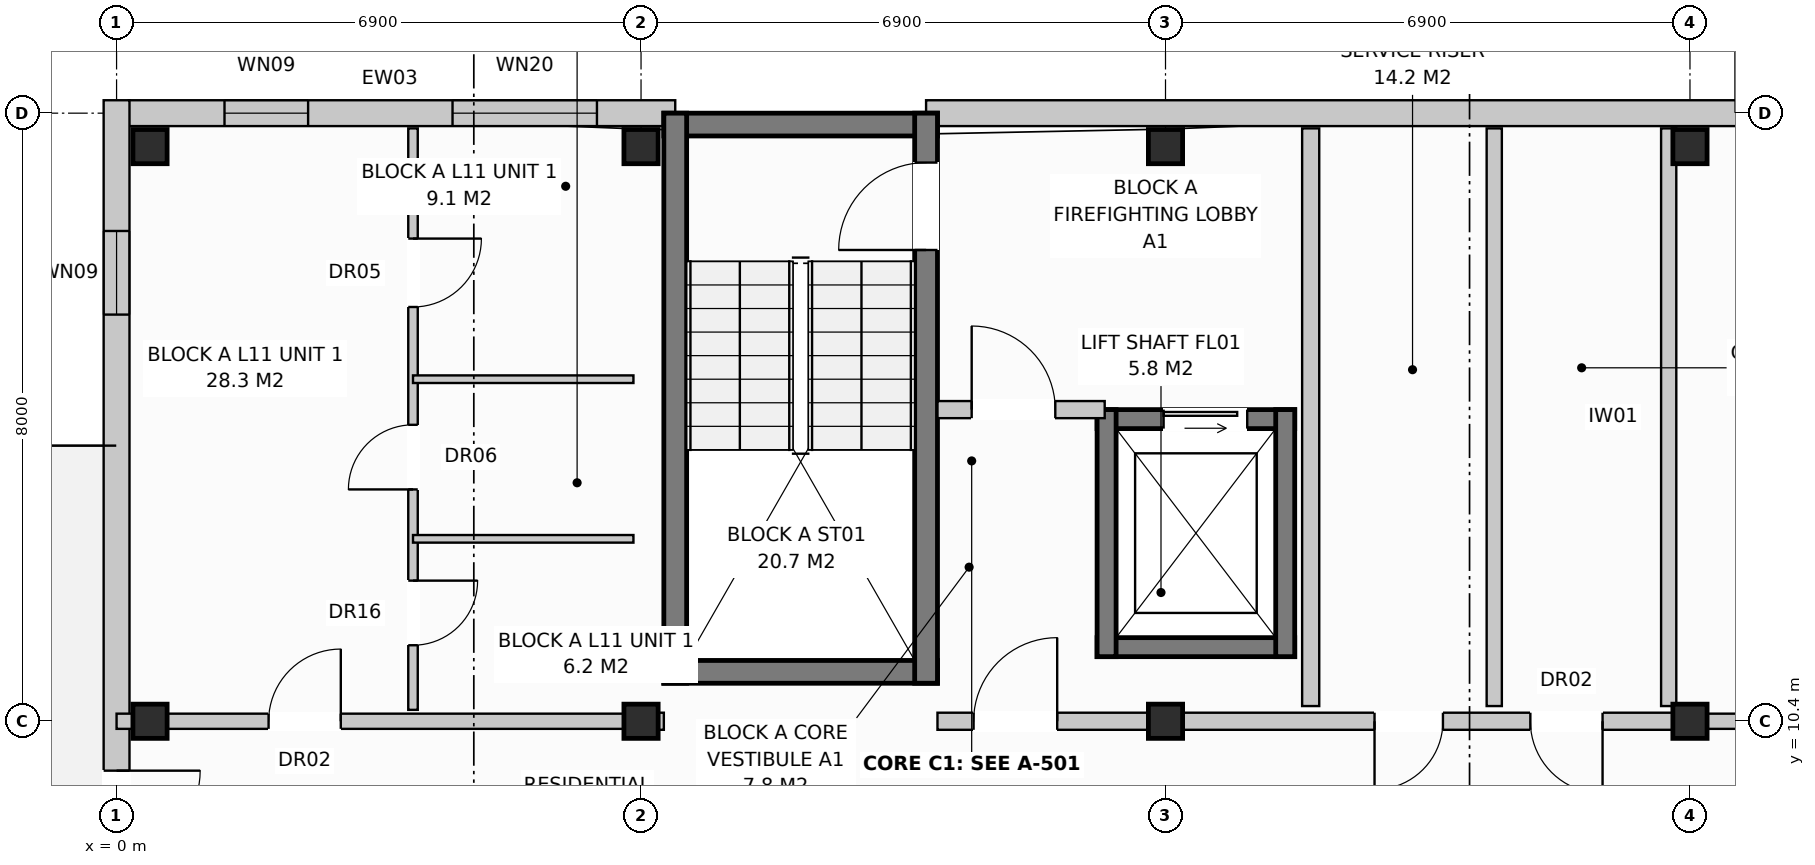
"""IFC4 building model, lengths in metres.
Left out: names, types, materials, properties, quantities, classifications, styles, units other than length and angle.
Written with IfcOpenShell. Run it as: python <this file> out.ifc"""

import sys

from ifc_helpers import new_model, si_unit, direction, frame, frame_2d, origin, origin_with_axes, origin_2d, place, context, subcontext, project, spatial, rectangle, extrude, element, fill, save


model = new_model("IFC4")
c1 = context("Model", 3, precision=1e-05, world=origin(), true_north=direction((0.0, 1.0)))
c2 = subcontext(c1, "Body", "Model", "MODEL_VIEW")
j1 = project(units=[si_unit("LENGTHUNIT", "METRE"), si_unit("PLANEANGLEUNIT", "RADIAN")], contexts=[c1])
p1 = place(None, origin())
s1 = spatial("IfcSite", under=j1, at=p1, CompositionType="ELEMENT")
p2 = place(p1, origin())
s2 = spatial("IfcBuilding", under=s1, at=p2, CompositionType="ELEMENT")
p3 = place(p2, frame((0.0, 0.0, 36.8)))
s3 = spatial("IfcBuildingStorey", under=s2, at=p3, CompositionType="ELEMENT", Elevation=36.8)
for number, where, z_axis, x_axis in (
    (1, (0.44, 10.4, 0.0), (0.0, 0.0, 1.0), (1.0, 0.0, 0.0)),
    (2, (0.44, 17.96, 0.0), (0.0, 0.0, 1.0), (1.0, 0.0, 0.0)),
    (3, (6.9, 10.4, 0.0), (0.0, 0.0, 1.0), (1.0, 0.0, 0.0)),
    (4, (6.9, 17.96, 0.0), (0.0, 0.0, 1.0), (1.0, 0.0, 0.0)),
    (5, (13.8, 10.4, 0.0), (0.0, 0.0, 1.0), (1.0, 0.0, 0.0)),
    (6, (13.8, 17.96, 0.0), (0.0, 0.0, 1.0), (1.0, 0.0, 0.0)),
    (7, (20.7, 10.4, 0.0), (0.0, 0.0, 1.0), (1.0, 0.0, 0.0)),
    (8, (20.7, 17.96, 0.0), (0.0, 0.0, 1.0), (1.0, 0.0, 0.0)),
):
    element("IfcColumn", number, at=place(p3, frame(where, z_axis=z_axis, x_axis=x_axis)), inside=s3, PredefinedType="COLUMN", context=c2, shape_type="SweptSolid", body=[
        extrude(rectangle(XDim=0.45, YDim=0.45, at=origin_2d()), origin(), (0.0, 0.0, 1.0), 3.2),
    ])
p4 = place(p3, frame((0.16, 18.4, 0.0), z_axis=(0.0, 0.0, 1.0), x_axis=(1.0, 0.0, 0.0)))
e9 = element("IfcWall", 9, at=p4, inside=s3, PredefinedType="STANDARD", context=c2, shape_type="SweptSolid", body=[
    extrude(rectangle(XDim=7.19, YDim=0.34, at=frame_2d((3.595, 0.0))), origin(), (0.0, 0.0, 1.0), 2.97),
])
p5 = place(p4, frame((1.26, 0.0, 0.72)))
e10 = element("IfcOpeningElement", 10, at=p5, cuts=e9, PredefinedType="OPENING", context=c2, shape_type="SweptSolid", body=[
    extrude(rectangle(XDim=1.1, YDim=1.5, at=frame_2d((0.55, 0.75))), frame((0.0, 0.182, 0.0), z_axis=(0.0, -1.0, 0.0), x_axis=(1.0, 0.0, 0.0)), (0.0, 0.0, 1.0), 0.364),
])
p6 = place(p4, frame((4.26, 0.0, 0.8)))
e11 = element("IfcOpeningElement", 11, at=p6, cuts=e9, PredefinedType="OPENING", context=c2, shape_type="SweptSolid", body=[
    extrude(rectangle(XDim=1.9, YDim=1.85, at=frame_2d((0.95, 0.925))), frame((0.0, 0.182, 0.0), z_axis=(0.0, -1.0, 0.0), x_axis=(1.0, 0.0, 0.0)), (0.0, 0.0, 1.0), 0.364),
])
p7 = place(p3, frame((10.65, 18.4, 0.0), z_axis=(0.0, 0.0, 1.0), x_axis=(1.0, 0.0, 0.0)))
e12 = element("IfcWall", 12, at=p7, inside=s3, PredefinedType="STANDARD", context=c2, shape_type="SweptSolid", body=[
    extrude(rectangle(XDim=17.4, YDim=0.34, at=frame_2d((8.7, 0.0))), origin(), (0.0, 0.0, 1.0), 2.97),
])
p8 = place(p7, frame((11.87, 0.0, 0.0)))
e13 = element("IfcOpeningElement", 13, at=p8, cuts=e12, PredefinedType="OPENING", context=c2, shape_type="SweptSolid", body=[
    extrude(rectangle(XDim=0.95, YDim=2.1, at=frame_2d((0.475, 1.05))), frame((0.0, 0.182, 0.0), z_axis=(0.0, -1.0, 0.0), x_axis=(1.0, 0.0, 0.0)), (0.0, 0.0, 1.0), 0.364),
])
p9 = place(p7, frame((14.87, 0.0, 0.72)))
e14 = element("IfcOpeningElement", 14, at=p9, cuts=e12, PredefinedType="OPENING", context=c2, shape_type="SweptSolid", body=[
    extrude(rectangle(XDim=1.1, YDim=1.5, at=frame_2d((0.55, 0.75))), frame((0.0, 0.182, 0.0), z_axis=(0.0, -1.0, 0.0), x_axis=(1.0, 0.0, 0.0)), (0.0, 0.0, 1.0), 0.364),
])
p10 = place(p3, frame((0.0, -0.17, 0.0), z_axis=(0.0, 0.0, 1.0), x_axis=(0.0, 1.0, 0.0)))
e15 = element("IfcWall", 15, at=p10, inside=s3, PredefinedType="STANDARD", context=c2, shape_type="SweptSolid", body=[
    extrude(rectangle(XDim=18.74, YDim=0.34, at=frame_2d((9.37, 0.0))), origin(), (0.0, 0.0, 1.0), 2.97),
])
p11 = place(p10, frame((8.82, 0.0, 0.0)))
e16 = element("IfcOpeningElement", 16, at=p11, cuts=e15, PredefinedType="OPENING", context=c2, shape_type="SweptSolid", body=[
    extrude(rectangle(XDim=1.1, YDim=2.1, at=frame_2d((0.55, 1.05))), frame((0.0, 0.182, 0.0), z_axis=(0.0, -1.0, 0.0), x_axis=(1.0, 0.0, 0.0)), (0.0, 0.0, 1.0), 0.364),
])
p12 = place(p10, frame((1.72, 0.0, 0.72)))
e17 = element("IfcOpeningElement", 17, at=p12, cuts=e15, PredefinedType="OPENING", context=c2, shape_type="SweptSolid", body=[
    extrude(rectangle(XDim=1.1, YDim=1.5, at=frame_2d((0.55, 0.75))), frame((0.0, 0.182, 0.0), z_axis=(0.0, -1.0, 0.0), x_axis=(1.0, 0.0, 0.0)), (0.0, 0.0, 1.0), 0.364),
])
p13 = place(p10, frame((15.92, 0.0, 0.72)))
e18 = element("IfcOpeningElement", 18, at=p13, cuts=e15, PredefinedType="OPENING", context=c2, shape_type="SweptSolid", body=[
    extrude(rectangle(XDim=1.1, YDim=1.5, at=frame_2d((0.55, 0.75))), frame((0.0, 0.182, 0.0), z_axis=(0.0, -1.0, 0.0), x_axis=(1.0, 0.0, 0.0)), (0.0, 0.0, 1.0), 0.364),
])
for number, where, z_axis, x_axis in (
    (19, (7.2, 18.25, 0.0), (0.0, 0.0, 1.0), (1.0, 0.0, 0.0)),
    (20, (7.2, 11.05, 0.0), (0.0, 0.0, 1.0), (1.0, 0.0, 0.0)),
):
    element("IfcWall", number, at=place(p3, frame(where, z_axis=z_axis, x_axis=x_axis)), inside=s3, PredefinedType="SHEAR", context=c2, shape_type="SweptSolid", body=[
        extrude(rectangle(XDim=3.6, YDim=0.3, at=frame_2d((1.8, 0.0))), origin(), (0.0, 0.0, 1.0), 2.97),
    ])
p14 = place(p3, frame((7.35, 10.9, 0.0), z_axis=(0.0, 0.0, 1.0), x_axis=(0.0, 1.0, 0.0)))
e21 = element("IfcWall", 21, at=p14, inside=s3, PredefinedType="SHEAR", context=c2, shape_type="SweptSolid", body=[
    extrude(rectangle(XDim=7.5, YDim=0.3, at=frame_2d((3.75, 0.0))), origin(), (0.0, 0.0, 1.0), 2.97),
])
p15 = place(p3, frame((10.65, 10.9, 0.0), z_axis=(0.0, 0.0, 1.0), x_axis=(0.0, 1.0, 0.0)))
e22 = element("IfcWall", 22, at=p15, inside=s3, PredefinedType="SHEAR", context=c2, shape_type="SweptSolid", body=[
    extrude(rectangle(XDim=7.5, YDim=0.3, at=frame_2d((3.75, 0.0))), origin(), (0.0, 0.0, 1.0), 2.97),
])
p16 = place(p15, frame((5.7, 0.0, 0.0)))
e23 = element("IfcOpeningElement", 23, at=p16, cuts=e22, PredefinedType="OPENING", context=c2, shape_type="SweptSolid", body=[
    extrude(rectangle(XDim=1.15, YDim=2.15, at=frame_2d((0.575, 1.075))), frame((0.0, 0.162, 0.0), z_axis=(0.0, -1.0, 0.0), x_axis=(1.0, 0.0, 0.0)), (0.0, 0.0, 1.0), 0.324),
])
p17 = place(p3, frame((12.9, 14.375, 0.0), z_axis=(0.0, 0.0, 1.0), x_axis=(1.0, 0.0, 0.0)))
e24 = element("IfcWall", 24, at=p17, inside=s3, PredefinedType="SHEAR", context=c2, shape_type="SweptSolid", body=[
    extrude(rectangle(XDim=2.6, YDim=0.25, at=frame_2d((1.3, 0.0))), origin(), (0.0, 0.0, 1.0), 2.97),
])
p18 = place(p17, frame((0.875, 0.0, 0.0)))
e25 = element("IfcOpeningElement", 25, at=p18, cuts=e24, PredefinedType="OPENING", context=c2, shape_type="SweptSolid", body=[
    extrude(rectangle(XDim=1.1, YDim=2.1, at=frame_2d((0.55, 1.05))), frame((0.0, 0.137, 0.0), z_axis=(0.0, -1.0, 0.0), x_axis=(1.0, 0.0, 0.0)), (0.0, 0.0, 1.0), 0.274),
])
p19 = place(p3, frame((12.9, 11.375, 0.0), z_axis=(0.0, 0.0, 1.0), x_axis=(1.0, 0.0, 0.0)))
e26 = element("IfcWall", 26, at=p19, inside=s3, PredefinedType="SHEAR", context=c2, shape_type="SweptSolid", body=[
    extrude(rectangle(XDim=2.6, YDim=0.25, at=frame_2d((1.3, 0.0))), origin(), (0.0, 0.0, 1.0), 2.97),
])
for number, where, z_axis, x_axis in (
    (27, (13.025, 11.25, 0.0), (0.0, 0.0, 1.0), (0.0, 1.0, 0.0)),
    (28, (15.375, 11.25, 0.0), (0.0, 0.0, 1.0), (0.0, 1.0, 0.0)),
):
    element("IfcWall", number, at=place(p3, frame(where, z_axis=z_axis, x_axis=x_axis)), inside=s3, PredefinedType="SHEAR", context=c2, shape_type="SweptSolid", body=[
        extrude(rectangle(XDim=3.25, YDim=0.25, at=frame_2d((1.625, 0.0))), origin(), (0.0, 0.0, 1.0), 2.97),
    ])
p20 = place(p3, frame((15.71, 10.6, 0.0), z_axis=(0.0, 0.0, 1.0), x_axis=(0.0, 1.0, 0.0)))
e29 = element("IfcWall", 29, at=p20, inside=s3, PredefinedType="PARTITIONING", context=c2, shape_type="SweptSolid", body=[
    extrude(rectangle(XDim=7.6, YDim=0.225, at=frame_2d((3.8, 0.0))), origin(), (0.0, 0.0, 1.0), 2.97),
])
p21 = place(p3, frame((10.8, 14.5, 0.0), z_axis=(0.0, 0.0, 1.0), x_axis=(1.0, 0.0, 0.0)))
e30 = element("IfcWall", 30, at=p21, inside=s3, PredefinedType="PARTITIONING", context=c2, shape_type="SweptSolid", body=[
    extrude(rectangle(XDim=2.2, YDim=0.225, at=frame_2d((1.1, 0.0))), origin(), (0.0, 0.0, 1.0), 2.97),
])
p22 = place(p21, frame((0.45, 0.0, 0.0)))
e31 = element("IfcOpeningElement", 31, at=p22, cuts=e30, PredefinedType="OPENING", context=c2, shape_type="SweptSolid", body=[
    extrude(rectangle(XDim=1.1, YDim=2.15, at=frame_2d((0.55, 1.075))), frame((0.0, 0.125, 0.0), z_axis=(0.0, -1.0, 0.0), x_axis=(1.0, 0.0, 0.0)), (0.0, 0.0, 1.0), 0.249),
])
p23 = place(p3, frame((6.9, 10.4, 0.0), z_axis=(0.0, 0.0, 1.0), x_axis=(1.0, 0.0, 0.0)))
e32 = element("IfcWall", 32, at=p23, inside=s3, PredefinedType="PARTITIONING", context=c2, shape_type="SweptSolid", body=[
    extrude(rectangle(XDim=0.3, YDim=0.225, at=frame_2d((0.15, 0.0))), origin(), (0.0, 0.0, 1.0), 2.97),
])
for number, where, z_axis, x_axis in (
    (33, (18.125, 10.6, 0.0), (0.0, 0.0, 1.0), (0.0, 1.0, 0.0)),
    (34, (20.42, 10.6, 0.0), (0.0, 0.0, 1.0), (0.0, 1.0, 0.0)),
):
    element("IfcWall", number, at=place(p3, frame(where, z_axis=z_axis, x_axis=x_axis)), inside=s3, PredefinedType="PARTITIONING", context=c2, shape_type="SweptSolid", body=[
        extrude(rectangle(XDim=7.6, YDim=0.2, at=frame_2d((3.8, 0.0))), origin(), (0.0, 0.0, 1.0), 2.97),
    ])
p24 = place(p3, frame((10.8, 10.4, 0.0), z_axis=(0.0, 0.0, 1.0), x_axis=(1.0, 0.0, 0.0)))
e35 = element("IfcWall", 35, at=p24, inside=s3, PredefinedType="PARTITIONING", context=c2, shape_type="SweptSolid", body=[
    extrude(rectangle(XDim=9.9, YDim=0.225, at=frame_2d((4.95, 0.0))), origin(), (0.0, 0.0, 1.0), 2.41),
])
p25 = place(p24, frame((0.475, 0.0, 0.0)))
e36 = element("IfcOpeningElement", 36, at=p25, cuts=e35, PredefinedType="OPENING", context=c2, shape_type="SweptSolid", body=[
    extrude(rectangle(XDim=1.1, YDim=2.15, at=frame_2d((0.55, 1.075))), frame((0.0, 0.125, 0.0), z_axis=(0.0, -1.0, 0.0), x_axis=(1.0, 0.0, 0.0)), (0.0, 0.0, 1.0), 0.249),
])
p26 = place(p24, frame((5.75, 0.0, 0.0)))
e37 = element("IfcOpeningElement", 37, at=p26, cuts=e35, PredefinedType="OPENING", context=c2, shape_type="SweptSolid", body=[
    extrude(rectangle(XDim=0.9, YDim=2.1, at=frame_2d((0.45, 1.05))), frame((0.0, 0.125, 0.0), z_axis=(0.0, -1.0, 0.0), x_axis=(1.0, 0.0, 0.0)), (0.0, 0.0, 1.0), 0.249),
])
p27 = place(p24, frame((7.8, 0.0, 0.0)))
e38 = element("IfcOpeningElement", 38, at=p27, cuts=e35, PredefinedType="OPENING", context=c2, shape_type="SweptSolid", body=[
    extrude(rectangle(XDim=0.95, YDim=2.15, at=frame_2d((0.475, 1.075))), frame((0.0, 0.125, 0.0), z_axis=(0.0, -1.0, 0.0), x_axis=(1.0, 0.0, 0.0)), (0.0, 0.0, 1.0), 0.249),
])
p28 = place(p3, frame((0.0, 10.4, 0.0), z_axis=(0.0, 0.0, 1.0), x_axis=(1.0, 0.0, 0.0)))
e39 = element("IfcWall", 39, at=p28, inside=s3, PredefinedType="PARTITIONING", context=c2, shape_type="SweptSolid", body=[
    extrude(rectangle(XDim=6.9, YDim=0.2, at=frame_2d((3.45, 0.0))), origin(), (0.0, 0.0, 1.0), 2.41),
])
p29 = place(p28, frame((2.0, 0.0, 0.0)))
e40 = element("IfcOpeningElement", 40, at=p29, cuts=e39, PredefinedType="OPENING", context=c2, shape_type="SweptSolid", body=[
    extrude(rectangle(XDim=0.95, YDim=2.15, at=frame_2d((0.475, 1.075))), frame((0.0, 0.112, 0.0), z_axis=(0.0, -1.0, 0.0), x_axis=(1.0, 0.0, 0.0)), (0.0, 0.0, 1.0), 0.224),
])
p30 = place(p3, frame((3.9, 10.55, 0.0), z_axis=(0.0, 0.0, 1.0), x_axis=(0.0, 1.0, 0.0)))
e41 = element("IfcWall", 41, at=p30, inside=s3, PredefinedType="PARTITIONING", context=c2, shape_type="SweptSolid", body=[
    extrude(rectangle(XDim=7.65, YDim=0.125, at=frame_2d((3.825, 0.0))), origin(), (0.0, 0.0, 1.0), 2.97),
])
p31 = place(p30, frame((0.85, 0.0, 0.0)))
e42 = element("IfcOpeningElement", 42, at=p31, cuts=e41, PredefinedType="OPENING", context=c2, shape_type="SweptSolid", body=[
    extrude(rectangle(XDim=0.85, YDim=2.1, at=frame_2d((0.425, 1.05))), frame((0.0, 0.074, 0.0), z_axis=(0.0, -1.0, 0.0), x_axis=(1.0, 0.0, 0.0)), (0.0, 0.0, 1.0), 0.149),
])
p32 = place(p30, frame((2.9, 0.0, 0.0)))
e43 = element("IfcOpeningElement", 43, at=p32, cuts=e41, PredefinedType="OPENING", context=c2, shape_type="SweptSolid", body=[
    extrude(rectangle(XDim=0.85, YDim=2.05, at=frame_2d((0.425, 1.025))), frame((0.0, 0.074, 0.0), z_axis=(0.0, -1.0, 0.0), x_axis=(1.0, 0.0, 0.0)), (0.0, 0.0, 1.0), 0.149),
])
p33 = place(p30, frame((5.3, 0.0, 0.0)))
e44 = element("IfcOpeningElement", 44, at=p33, cuts=e41, PredefinedType="OPENING", context=c2, shape_type="SweptSolid", body=[
    extrude(rectangle(XDim=0.9, YDim=2.1, at=frame_2d((0.45, 1.05))), frame((0.0, 0.074, 0.0), z_axis=(0.0, -1.0, 0.0), x_axis=(1.0, 0.0, 0.0)), (0.0, 0.0, 1.0), 0.149),
])
for number, where, z_axis, x_axis in (
    (45, (3.9, 12.8, 0.0), (0.0, 0.0, 1.0), (1.0, 0.0, 0.0)),
    (46, (3.9, 14.9, 0.0), (0.0, 0.0, 1.0), (1.0, 0.0, 0.0)),
):
    element("IfcWall", number, at=place(p3, frame(where, z_axis=z_axis, x_axis=x_axis)), inside=s3, PredefinedType="PARTITIONING", context=c2, shape_type="SweptSolid", body=[
        extrude(rectangle(XDim=2.9, YDim=0.1, at=frame_2d((1.45, 0.0))), origin(), (0.0, 0.0, 1.0), 2.97),
    ])
p34 = place(p3, frame((20.7, 10.4, 0.0), z_axis=(0.0, 0.0, 1.0), x_axis=(1.0, 0.0, 0.0)))
e47 = element("IfcWall", 47, at=p34, inside=s3, PredefinedType="PARTITIONING", context=c2, shape_type="SweptSolid", body=[
    extrude(rectangle(XDim=6.9, YDim=0.2, at=frame_2d((3.45, 0.0))), origin(), (0.0, 0.0, 1.0), 2.41),
])
p35 = place(p34, frame((2.0, 0.0, 0.0)))
e48 = element("IfcOpeningElement", 48, at=p35, cuts=e47, PredefinedType="OPENING", context=c2, shape_type="SweptSolid", body=[
    extrude(rectangle(XDim=0.95, YDim=2.15, at=frame_2d((0.475, 1.075))), frame((0.0, 0.112, 0.0), z_axis=(0.0, -1.0, 0.0), x_axis=(1.0, 0.0, 0.0)), (0.0, 0.0, 1.0), 0.224),
])
p36 = place(p5, origin_with_axes())
e49 = element("IfcWindow", 49, at=p36, inside=s3, PartitioningType="SINGLE_PANEL", PredefinedType="WINDOW", context=c2, shape_type="SweptSolid", body=[
    extrude(rectangle(XDim=1.1, YDim=1.5, at=frame_2d((0.55, 0.75))), frame((0.0, 0.03, 0.0), z_axis=(0.0, -1.0, 0.0), x_axis=(1.0, 0.0, 0.0)), (0.0, 0.0, 1.0), 0.06),
])
fill(e10, e49)
p37 = place(p6, origin_with_axes())
e50 = element("IfcWindow", 50, at=p37, inside=s3, PartitioningType="SINGLE_PANEL", PredefinedType="WINDOW", context=c2, shape_type="SweptSolid", body=[
    extrude(rectangle(XDim=1.9, YDim=1.85, at=frame_2d((0.95, 0.925))), frame((0.0, 0.03, 0.0), z_axis=(0.0, -1.0, 0.0), x_axis=(1.0, 0.0, 0.0)), (0.0, 0.0, 1.0), 0.06),
])
fill(e11, e50)
p38 = place(p11, frame((1.1, 0.0, 0.0), z_axis=(0.0, 0.0, 1.0), x_axis=(-1.0, 0.0, 0.0)))
e51 = element("IfcDoor", 51, at=p38, inside=s3, OperationType="SINGLE_SWING_RIGHT", PredefinedType="DOOR", context=c2, shape_type="SweptSolid", body=[
    extrude(rectangle(XDim=1.1, YDim=2.1, at=frame_2d((0.55, 1.05))), frame((0.0, 0.025, 0.0), z_axis=(0.0, -1.0, 0.0), x_axis=(1.0, 0.0, 0.0)), (0.0, 0.0, 1.0), 0.05),
])
fill(e16, e51)
p39 = place(p13, origin_with_axes())
e52 = element("IfcWindow", 52, at=p39, inside=s3, PartitioningType="SINGLE_PANEL", PredefinedType="WINDOW", context=c2, shape_type="SweptSolid", body=[
    extrude(rectangle(XDim=1.1, YDim=1.5, at=frame_2d((0.55, 0.75))), frame((0.0, 0.03, 0.0), z_axis=(0.0, -1.0, 0.0), x_axis=(1.0, 0.0, 0.0)), (0.0, 0.0, 1.0), 0.06),
])
fill(e18, e52)
p40 = place(p16, origin_with_axes())
e53 = element("IfcDoor", 53, at=p40, inside=s3, OperationType="SINGLE_SWING_LEFT", PredefinedType="DOOR", context=c2, shape_type="SweptSolid", body=[
    extrude(rectangle(XDim=1.15, YDim=2.15, at=frame_2d((0.575, 1.075))), frame((0.0, 0.025, 0.0), z_axis=(0.0, -1.0, 0.0), x_axis=(1.0, 0.0, 0.0)), (0.0, 0.0, 1.0), 0.05),
])
fill(e23, e53)
p41 = place(p18, origin_with_axes())
e54 = element("IfcDoor", 54, at=p41, inside=s3, OperationType="SLIDING_TO_LEFT", PredefinedType="DOOR", context=c2, shape_type="SweptSolid", body=[
    extrude(rectangle(XDim=1.1, YDim=2.1, at=frame_2d((0.55, 1.05))), frame((0.0, 0.025, 0.0), z_axis=(0.0, -1.0, 0.0), x_axis=(1.0, 0.0, 0.0)), (0.0, 0.0, 1.0), 0.05),
])
fill(e25, e54)
p42 = place(p22, origin_with_axes())
e55 = element("IfcDoor", 55, at=p42, inside=s3, OperationType="SINGLE_SWING_LEFT", PredefinedType="DOOR", context=c2, shape_type="SweptSolid", body=[
    extrude(rectangle(XDim=1.1, YDim=2.15, at=frame_2d((0.55, 1.075))), frame((0.0, 0.025, 0.0), z_axis=(0.0, -1.0, 0.0), x_axis=(1.0, 0.0, 0.0)), (0.0, 0.0, 1.0), 0.05),
])
fill(e31, e55)
p43 = place(p25, origin_with_axes())
e56 = element("IfcDoor", 56, at=p43, inside=s3, OperationType="SINGLE_SWING_RIGHT", PredefinedType="DOOR", context=c2, shape_type="SweptSolid", body=[
    extrude(rectangle(XDim=1.1, YDim=2.15, at=frame_2d((0.55, 1.075))), frame((0.0, 0.025, 0.0), z_axis=(0.0, -1.0, 0.0), x_axis=(1.0, 0.0, 0.0)), (0.0, 0.0, 1.0), 0.05),
])
fill(e36, e56)
p44 = place(p26, frame((0.9, 0.0, 0.0), z_axis=(0.0, 0.0, 1.0), x_axis=(-1.0, 0.0, 0.0)))
e57 = element("IfcDoor", 57, at=p44, inside=s3, OperationType="SINGLE_SWING_LEFT", PredefinedType="DOOR", context=c2, shape_type="SweptSolid", body=[
    extrude(rectangle(XDim=0.9, YDim=2.1, at=frame_2d((0.45, 1.05))), frame((0.0, 0.025, 0.0), z_axis=(0.0, -1.0, 0.0), x_axis=(1.0, 0.0, 0.0)), (0.0, 0.0, 1.0), 0.05),
])
fill(e37, e57)
p45 = place(p27, frame((0.95, 0.0, 0.0), z_axis=(0.0, 0.0, 1.0), x_axis=(-1.0, 0.0, 0.0)))
e58 = element("IfcDoor", 58, at=p45, inside=s3, OperationType="SINGLE_SWING_RIGHT", PredefinedType="DOOR", context=c2, shape_type="SweptSolid", body=[
    extrude(rectangle(XDim=0.95, YDim=2.15, at=frame_2d((0.475, 1.075))), frame((0.0, 0.025, 0.0), z_axis=(0.0, -1.0, 0.0), x_axis=(1.0, 0.0, 0.0)), (0.0, 0.0, 1.0), 0.05),
])
fill(e38, e58)
p46 = place(p29, origin_with_axes())
e59 = element("IfcDoor", 59, at=p46, inside=s3, OperationType="SINGLE_SWING_RIGHT", PredefinedType="DOOR", context=c2, shape_type="SweptSolid", body=[
    extrude(rectangle(XDim=0.95, YDim=2.15, at=frame_2d((0.475, 1.075))), frame((0.0, 0.025, 0.0), z_axis=(0.0, -1.0, 0.0), x_axis=(1.0, 0.0, 0.0)), (0.0, 0.0, 1.0), 0.05),
])
fill(e40, e59)
p47 = place(p31, frame((0.85, 0.0, 0.0), z_axis=(0.0, 0.0, 1.0), x_axis=(-1.0, 0.0, 0.0)))
e60 = element("IfcDoor", 60, at=p47, inside=s3, OperationType="SINGLE_SWING_RIGHT", PredefinedType="DOOR", context=c2, shape_type="SweptSolid", body=[
    extrude(rectangle(XDim=0.85, YDim=2.1, at=frame_2d((0.425, 1.05))), frame((0.0, 0.025, 0.0), z_axis=(0.0, -1.0, 0.0), x_axis=(1.0, 0.0, 0.0)), (0.0, 0.0, 1.0), 0.05),
])
fill(e42, e60)
p48 = place(p32, origin_with_axes())
e61 = element("IfcDoor", 61, at=p48, inside=s3, OperationType="SINGLE_SWING_LEFT", PredefinedType="DOOR", context=c2, shape_type="SweptSolid", body=[
    extrude(rectangle(XDim=0.85, YDim=2.05, at=frame_2d((0.425, 1.025))), frame((0.0, 0.025, 0.0), z_axis=(0.0, -1.0, 0.0), x_axis=(1.0, 0.0, 0.0)), (0.0, 0.0, 1.0), 0.05),
])
fill(e43, e61)
p49 = place(p33, frame((0.9, 0.0, 0.0), z_axis=(0.0, 0.0, 1.0), x_axis=(-1.0, 0.0, 0.0)))
e62 = element("IfcDoor", 62, at=p49, inside=s3, OperationType="SINGLE_SWING_RIGHT", PredefinedType="DOOR", context=c2, shape_type="SweptSolid", body=[
    extrude(rectangle(XDim=0.9, YDim=2.1, at=frame_2d((0.45, 1.05))), frame((0.0, 0.025, 0.0), z_axis=(0.0, -1.0, 0.0), x_axis=(1.0, 0.0, 0.0)), (0.0, 0.0, 1.0), 0.05),
])
fill(e44, e62)
save(model, sys.argv[1])
